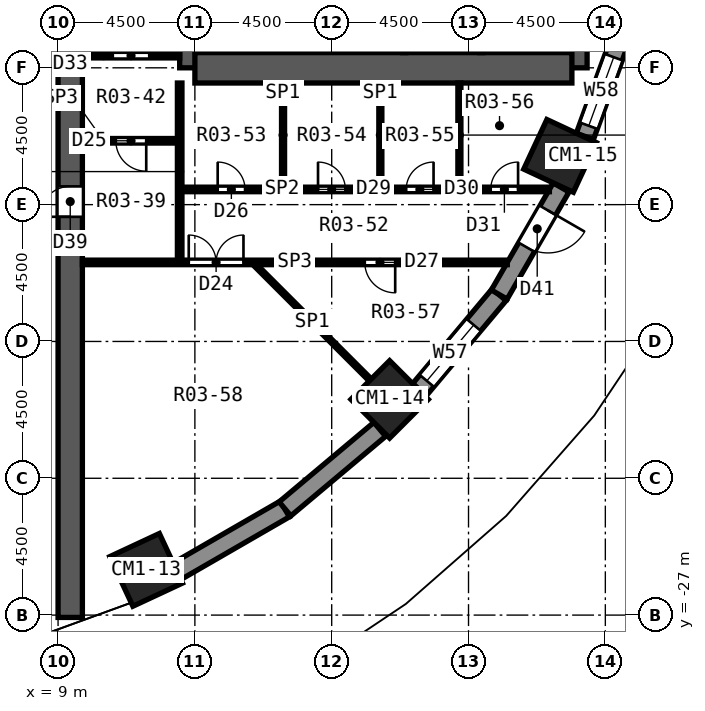
"""IFC4 building model, lengths in metres.
Left out: names, types, materials, properties, quantities, classifications, styles, units other than length and angle.
Written with IfcOpenShell. Run it as: python <this file> out.ifc"""

import sys

from ifc_helpers import new_model, si_unit, direction, frame, frame_2d, origin, origin_2d, place, context, subcontext, project, spatial, polyline, rectangle, outline, extrude, element, fill, save


model = new_model("IFC4")
c1 = context("Model", 3, precision=1e-05, world=origin(), true_north=direction((0.0, 1.0)))
c2 = subcontext(c1, "Body", "Model", "MODEL_VIEW")
j1 = project(units=[si_unit("LENGTHUNIT", "METRE"), si_unit("PLANEANGLEUNIT", "RADIAN")], contexts=[c1])
p1 = place(None, origin())
s1 = spatial("IfcSite", under=j1, at=p1, CompositionType="ELEMENT")
p2 = place(p1, origin())
s2 = spatial("IfcBuilding", under=s1, at=p2, CompositionType="ELEMENT")
p3 = place(p2, origin())
s3 = spatial("IfcBuildingStorey", under=s2, at=p3, CompositionType="ELEMENT", Elevation=0.0)
for number, where, z_axis, x_axis in (
    (1, (11.897, -25.512, 0.0), (0.0, 0.0, 1.0), (0.423, -0.906, 0.0)),
    (2, (19.905, -19.905, 0.0), (0.0, 0.0, 1.0), (0.707, -0.707, 0.0)),
    (3, (25.512, -11.897, 0.0), (0.0, 0.0, 1.0), (0.906, -0.423, 0.0)),
):
    element("IfcColumn", number, at=place(p3, frame(where, z_axis=z_axis, x_axis=x_axis)), inside=s3, PredefinedType="COLUMN", context=c2, shape_type="SweptSolid", body=[
        extrude(rectangle(XDim=1.8, YDim=1.8, at=origin_2d()), origin(), (0.0, 0.0, 1.0), 5.0),
    ])
p4 = place(p3, frame((13.5, -9.0, 0.0), z_axis=(0.0, 0.0, 1.0), x_axis=(0.0, 1.0, 0.0)))
e4 = element("IfcWall", 4, at=p4, inside=s3, PredefinedType="SHEAR", context=c2, shape_type="SweptSolid", body=[
    extrude(rectangle(XDim=18.0, YDim=1.0, at=frame_2d((9.0, 0.0))), origin(), (0.0, 0.0, 1.0), 5.0),
])
p5 = place(p4, frame((15.4, 0.0, 0.0)))
e5 = element("IfcOpeningElement", 5, at=p5, cuts=e4, PredefinedType="OPENING", context=c2, shape_type="SweptSolid", body=[
    extrude(rectangle(XDim=1.2, YDim=2.1, at=frame_2d((0.6, 1.05))), frame((0.0, 0.512, 0.0), z_axis=(0.0, -1.0, 0.0), x_axis=(1.0, 0.0, 0.0)), (0.0, 0.0, 1.0), 1.024),
])
p6 = place(p4, frame((1.4, 0.0, 0.0)))
e6 = element("IfcOpeningElement", 6, at=p6, cuts=e4, PredefinedType="OPENING", context=c2, shape_type="SweptSolid", body=[
    extrude(rectangle(XDim=1.2, YDim=2.1, at=frame_2d((0.6, 1.05))), frame((0.0, 0.512, 0.0), z_axis=(0.0, -1.0, 0.0), x_axis=(1.0, 0.0, 0.0)), (0.0, 0.0, 1.0), 1.024),
])
p7 = place(p4, frame((7.5, 0.0, 0.0)))
e7 = element("IfcOpeningElement", 7, at=p7, cuts=e4, PredefinedType="OPENING", context=c2, shape_type="SweptSolid", body=[
    extrude(rectangle(XDim=3.0, YDim=2.4, at=frame_2d((1.5, 1.2))), frame((0.0, 0.512, 0.0), z_axis=(0.0, -1.0, 0.0), x_axis=(1.0, 0.0, 0.0)), (0.0, 0.0, 1.0), 1.024),
])
p8 = place(p3, frame((25.9, -9.0, 0.0), z_axis=(0.0, 0.0, 1.0), x_axis=(0.0, 1.0, 0.0)))
e8 = element("IfcWall", 8, at=p8, inside=s3, PredefinedType="SHEAR", context=c2, shape_type="SweptSolid", body=[
    extrude(rectangle(XDim=18.0, YDim=1.0, at=frame_2d((9.0, 0.0))), origin(), (0.0, 0.0, 1.0), 5.0),
])
p9 = place(p3, frame((13.5, -9.0, 0.0), z_axis=(0.0, 0.0, 1.0), x_axis=(1.0, 0.0, 0.0)))
e9 = element("IfcWall", 9, at=p9, inside=s3, PredefinedType="SHEAR", context=c2, shape_type="SweptSolid", body=[
    extrude(rectangle(XDim=12.4, YDim=1.0, at=frame_2d((6.2, 0.0))), origin(), (0.0, 0.0, 1.0), 5.0),
])
p10 = place(p3, frame((9.4, -27.077, 0.0), z_axis=(0.0, 0.0, 1.0), x_axis=(0.0, 1.0, 0.0)))
e10 = element("IfcWall", 10, at=p10, inside=s3, PredefinedType="SHEAR", context=c2, shape_type="SweptSolid", body=[
    extrude(rectangle(XDim=54.154, YDim=0.8, at=frame_2d((27.077, 0.0))), origin(), (0.0, 0.0, 1.0), 5.0),
])
p11 = place(p10, frame((18.877, 0.0, 0.0)))
e11 = element("IfcOpeningElement", 11, at=p11, cuts=e10, PredefinedType="OPENING", context=c2, shape_type="SweptSolid", body=[
    extrude(rectangle(XDim=1.4, YDim=2.1, at=frame_2d((0.7, 1.05))), frame((0.0, 0.412, 0.0), z_axis=(0.0, -1.0, 0.0), x_axis=(1.0, 0.0, 0.0)), (0.0, 0.0, 1.0), 0.824),
])
p12 = place(p10, frame((22.677, 0.0, 0.3)))
e12 = element("IfcOpeningElement", 12, at=p12, cuts=e10, PredefinedType="OPENING", context=c2, shape_type="SweptSolid", body=[
    extrude(rectangle(XDim=2.4, YDim=2.1, at=frame_2d((1.2, 1.05))), frame((0.0, 0.412, 0.0), z_axis=(0.0, -1.0, 0.0), x_axis=(1.0, 0.0, 0.0)), (0.0, 0.0, 1.0), 0.824),
])
p13 = place(p10, frame((28.377, 0.0, 0.0)))
e13 = element("IfcOpeningElement", 13, at=p13, cuts=e10, PredefinedType="OPENING", context=c2, shape_type="SweptSolid", body=[
    extrude(rectangle(XDim=1.4, YDim=2.1, at=frame_2d((0.7, 1.05))), frame((0.0, 0.412, 0.0), z_axis=(0.0, -1.0, 0.0), x_axis=(1.0, 0.0, 0.0)), (0.0, 0.0, 1.0), 0.824),
])
p14 = place(p10, frame((29.977, 0.0, 0.3)))
e14 = element("IfcOpeningElement", 14, at=p14, cuts=e10, PredefinedType="OPENING", context=c2, shape_type="SweptSolid", body=[
    extrude(rectangle(XDim=2.4, YDim=2.1, at=frame_2d((1.2, 1.05))), frame((0.0, 0.412, 0.0), z_axis=(0.0, -1.0, 0.0), x_axis=(1.0, 0.0, 0.0)), (0.0, 0.0, 1.0), 0.824),
])
p15 = place(p10, frame((35.377, 0.0, 0.0)))
e15 = element("IfcOpeningElement", 15, at=p15, cuts=e10, PredefinedType="OPENING", context=c2, shape_type="SweptSolid", body=[
    extrude(rectangle(XDim=1.4, YDim=2.1, at=frame_2d((0.7, 1.05))), frame((0.0, 0.412, 0.0), z_axis=(0.0, -1.0, 0.0), x_axis=(1.0, 0.0, 0.0)), (0.0, 0.0, 1.0), 0.824),
])
p16 = place(p10, frame((38.477, 0.0, 0.3)))
e16 = element("IfcOpeningElement", 16, at=p16, cuts=e10, PredefinedType="OPENING", context=c2, shape_type="SweptSolid", body=[
    extrude(rectangle(XDim=2.4, YDim=2.1, at=frame_2d((1.2, 1.05))), frame((0.0, 0.412, 0.0), z_axis=(0.0, -1.0, 0.0), x_axis=(1.0, 0.0, 0.0)), (0.0, 0.0, 1.0), 0.824),
])
p17 = place(p10, frame((13.177, 0.0, 0.0)))
e17 = element("IfcOpeningElement", 17, at=p17, cuts=e10, PredefinedType="OPENING", context=c2, shape_type="SweptSolid", body=[
    extrude(rectangle(XDim=1.0, YDim=2.1, at=frame_2d((0.5, 1.05))), frame((0.0, 0.412, 0.0), z_axis=(0.0, -1.0, 0.0), x_axis=(1.0, 0.0, 0.0)), (0.0, 0.0, 1.0), 0.824),
])
p18 = place(p3, frame((12.934, -25.545, 0.0), z_axis=(0.0, 0.0, 1.0), x_axis=(0.866011732453, 0.500023678693, 0.0)))
e18 = element("IfcWall", 18, at=p18, inside=s3, PredefinedType="SOLIDWALL", context=c2, shape_type="SweptSolid", body=[
    extrude(rectangle(XDim=4.069, YDim=0.6, at=frame_2d((2.035, 0.0))), origin(), (0.0, 0.0, 1.0), 4.45),
])
p19 = place(p3, frame((16.464, -23.506, 0.0), z_axis=(0.0, 0.0, 1.0), x_axis=(0.766033337734, 0.642800844336, 0.0)))
e19 = element("IfcWall", 19, at=p19, inside=s3, PredefinedType="SOLIDWALL", context=c2, shape_type="SweptSolid", body=[
    extrude(rectangle(XDim=4.069, YDim=0.6, at=frame_2d((2.035, 0.0))), origin(), (0.0, 0.0, 1.0), 4.45),
])
p20 = place(p3, frame((20.891, -19.581, 0.0), z_axis=(0.0, 0.0, 1.0), x_axis=(0.642800844336, 0.766033337734, 0.0)))
e20 = element("IfcWall", 20, at=p20, inside=s3, PredefinedType="SOLIDWALL", context=c2, shape_type="SweptSolid", body=[
    extrude(rectangle(XDim=4.069, YDim=0.6, at=frame_2d((2.035, 0.0))), origin(), (0.0, 0.0, 1.0), 4.45),
])
p21 = place(p20, frame((0.372, 0.0, 0.3)))
e21 = element("IfcOpeningElement", 21, at=p21, cuts=e20, PredefinedType="OPENING", context=c2, shape_type="SweptSolid", body=[
    extrude(rectangle(XDim=2.4, YDim=2.1, at=frame_2d((1.2, 1.05))), frame((0.0, 0.312, 0.0), z_axis=(0.0, -1.0, 0.0), x_axis=(1.0, 0.0, 0.0)), (0.0, 0.0, 1.0), 0.624),
])
p22 = place(p3, frame((23.51, -16.458, 0.0), z_axis=(0.0, 0.0, 1.0), x_axis=(0.500023678693, 0.866011732453, 0.0)))
e22 = element("IfcWall", 22, at=p22, inside=s3, PredefinedType="SOLIDWALL", context=c2, shape_type="SweptSolid", body=[
    extrude(rectangle(XDim=4.069, YDim=0.6, at=frame_2d((2.035, 0.0))), origin(), (0.0, 0.0, 1.0), 4.45),
])
p23 = place(p22, frame((1.798, 0.0, 0.0)))
e23 = element("IfcOpeningElement", 23, at=p23, cuts=e22, PredefinedType="OPENING", context=c2, shape_type="SweptSolid", body=[
    extrude(rectangle(XDim=1.4, YDim=2.1, at=frame_2d((0.7, 1.05))), frame((0.0, 0.312, 0.0), z_axis=(0.0, -1.0, 0.0), x_axis=(1.0, 0.0, 0.0)), (0.0, 0.0, 1.0), 0.624),
])
p24 = place(p3, frame((26.328, -11.255, 0.0), z_axis=(0.0, 0.0, 1.0), x_axis=(0.342034744565, 0.939687306241, 0.0)))
e24 = element("IfcWall", 24, at=p24, inside=s3, PredefinedType="SOLIDWALL", context=c2, shape_type="SweptSolid", body=[
    extrude(rectangle(XDim=4.099, YDim=0.6, at=frame_2d((2.05, 0.0))), origin(), (0.0, 0.0, 1.0), 4.45),
])
p25 = place(p24, frame((0.372, 0.0, 0.3)))
e25 = element("IfcOpeningElement", 25, at=p25, cuts=e24, PredefinedType="OPENING", context=c2, shape_type="SweptSolid", body=[
    extrude(rectangle(XDim=2.4, YDim=2.1, at=frame_2d((1.2, 1.05))), frame((0.0, 0.312, 0.0), z_axis=(0.0, -1.0, 0.0), x_axis=(1.0, 0.0, 0.0)), (0.0, 0.0, 1.0), 0.624),
])
p26 = place(p3, frame((11.641, -26.507, 0.0), z_axis=(0.342042318612, -0.939682427765, 0.001996804339), x_axis=(-0.939684301135, -0.342043000515, 0.0)))
e26 = element("IfcWall", 26, at=p26, inside=s3, PredefinedType="SOLIDWALL", context=c2, shape_type="SweptSolid", body=[
    extrude(outline(polyline([(0.0, 0.0), (2.81, 2.168e-19), (2.81, -4.45), (0.0, -4.45), (0.0, 0.0)])), origin(), (0.0, 0.0, -1.0), 0.38),
])
p27 = place(p3, frame((15.453, -15.453, 0.0), z_axis=(0.0, 0.0, 1.0), x_axis=(0.707220086868, -0.706993457346, 0.0)))
e27 = element("IfcWall", 27, at=p27, inside=s3, PredefinedType="PARTITIONING", context=c2, shape_type="SweptSolid", body=[
    extrude(rectangle(XDim=5.386, YDim=0.1, at=frame_2d((2.693, 0.0))), origin(), (0.0, 0.0, 1.0), 4.45),
])
p28 = place(p3, frame((9.8, -15.4, 0.0), z_axis=(0.0, 0.0, 1.0), x_axis=(1.0, 0.0, 0.0)))
e28 = element("IfcWall", 28, at=p28, inside=s3, PredefinedType="PARTITIONING", context=c2, shape_type="SweptSolid", body=[
    extrude(rectangle(XDim=13.975, YDim=0.15, at=frame_2d((6.987, 0.0))), origin(), (0.0, 0.0, 1.0), 4.45),
])
p29 = place(p28, frame((3.498, 0.0, 0.0)))
e29 = element("IfcOpeningElement", 29, at=p29, cuts=e28, PredefinedType="OPENING", context=c2, shape_type="SweptSolid", body=[
    extrude(rectangle(XDim=1.8, YDim=2.1, at=frame_2d((0.9, 1.05))), frame((0.0, 0.087, 0.0), z_axis=(0.0, -1.0, 0.0), x_axis=(1.0, 0.0, 0.0)), (0.0, 0.0, 1.0), 0.174),
])
p30 = place(p28, frame((9.289, 0.0, 0.0)))
e30 = element("IfcOpeningElement", 30, at=p30, cuts=e28, PredefinedType="OPENING", context=c2, shape_type="SweptSolid", body=[
    extrude(rectangle(XDim=1.0, YDim=2.1, at=frame_2d((0.5, 1.05))), frame((0.0, 0.087, 0.0), z_axis=(0.0, -1.0, 0.0), x_axis=(1.0, 0.0, 0.0)), (0.0, 0.0, 1.0), 0.174),
])
p31 = place(p3, frame((13.075, -13.0, 0.0), z_axis=(0.0, 0.0, 1.0), x_axis=(1.0, 0.0, 0.0)))
e31 = element("IfcWall", 31, at=p31, inside=s3, PredefinedType="PARTITIONING", context=c2, shape_type="SweptSolid", body=[
    extrude(rectangle(XDim=12.085, YDim=0.15, at=frame_2d((6.042, 0.0))), origin(), (0.0, 0.0, 1.0), 4.45),
])
p32 = place(p31, frame((1.175, 0.0, 0.0)))
e32 = element("IfcOpeningElement", 32, at=p32, cuts=e31, PredefinedType="OPENING", context=c2, shape_type="SweptSolid", body=[
    extrude(rectangle(XDim=0.9, YDim=2.1, at=frame_2d((0.45, 1.05))), frame((0.0, 0.087, 0.0), z_axis=(0.0, -1.0, 0.0), x_axis=(1.0, 0.0, 0.0)), (0.0, 0.0, 1.0), 0.174),
])
p33 = place(p31, frame((4.475, 0.0, 0.0)))
e33 = element("IfcOpeningElement", 33, at=p33, cuts=e31, PredefinedType="OPENING", context=c2, shape_type="SweptSolid", body=[
    extrude(rectangle(XDim=0.9, YDim=2.1, at=frame_2d((0.45, 1.05))), frame((0.0, 0.087, 0.0), z_axis=(0.0, -1.0, 0.0), x_axis=(1.0, 0.0, 0.0)), (0.0, 0.0, 1.0), 0.174),
])
p34 = place(p31, frame((7.375, 0.0, 0.0)))
e34 = element("IfcOpeningElement", 34, at=p34, cuts=e31, PredefinedType="OPENING", context=c2, shape_type="SweptSolid", body=[
    extrude(rectangle(XDim=0.9, YDim=2.1, at=frame_2d((0.45, 1.05))), frame((0.0, 0.087, 0.0), z_axis=(0.0, -1.0, 0.0), x_axis=(1.0, 0.0, 0.0)), (0.0, 0.0, 1.0), 0.174),
])
p35 = place(p31, frame((10.155, 0.0, 0.0)))
e35 = element("IfcOpeningElement", 35, at=p35, cuts=e31, PredefinedType="OPENING", context=c2, shape_type="SweptSolid", body=[
    extrude(rectangle(XDim=0.9, YDim=2.1, at=frame_2d((0.45, 1.05))), frame((0.0, 0.087, 0.0), z_axis=(0.0, -1.0, 0.0), x_axis=(1.0, 0.0, 0.0)), (0.0, 0.0, 1.0), 0.174),
])
p36 = place(p3, frame((9.8, -11.4, 0.0), z_axis=(0.0, 0.0, 1.0), x_axis=(1.0, 0.0, 0.0)))
e36 = element("IfcWall", 36, at=p36, inside=s3, PredefinedType="PARTITIONING", context=c2, shape_type="SweptSolid", body=[
    extrude(rectangle(XDim=3.125, YDim=0.15, at=frame_2d((1.562, 0.0))), origin(), (0.0, 0.0, 1.0), 4.45),
])
p37 = place(p36, frame((1.1, 0.0, 0.0)))
e37 = element("IfcOpeningElement", 37, at=p37, cuts=e36, PredefinedType="OPENING", context=c2, shape_type="SweptSolid", body=[
    extrude(rectangle(XDim=1.0, YDim=2.1, at=frame_2d((0.5, 1.05))), frame((0.0, 0.087, 0.0), z_axis=(0.0, -1.0, 0.0), x_axis=(1.0, 0.0, 0.0)), (0.0, 0.0, 1.0), 0.174),
])
p38 = place(p3, frame((9.8, -8.6, 0.0), z_axis=(0.0, 0.0, 1.0), x_axis=(1.0, 0.0, 0.0)))
e38 = element("IfcWall", 38, at=p38, inside=s3, PredefinedType="PARTITIONING", context=c2, shape_type="SweptSolid", body=[
    extrude(rectangle(XDim=3.2, YDim=0.15, at=frame_2d((1.6, 0.0))), origin(), (0.0, 0.0, 1.0), 4.45),
])
p39 = place(p38, frame((1.0, 0.0, 0.0)))
e39 = element("IfcOpeningElement", 39, at=p39, cuts=e38, PredefinedType="OPENING", context=c2, shape_type="SweptSolid", body=[
    extrude(rectangle(XDim=1.2, YDim=2.1, at=frame_2d((0.6, 1.05))), frame((0.0, 0.087, 0.0), z_axis=(0.0, -1.0, 0.0), x_axis=(1.0, 0.0, 0.0)), (0.0, 0.0, 1.0), 0.174),
])
for number, where, z_axis, x_axis in (
    (40, (22.2, -12.925, 0.0), (0.0, 0.0, 1.0), (0.0, 1.0, 0.0)),
    (41, (19.6, -12.925, 0.0), (0.0, 0.0, 1.0), (0.0, 1.0, 0.0)),
    (42, (16.4, -12.925, 0.0), (0.0, 0.0, 1.0), (0.0, 1.0, 0.0)),
):
    element("IfcWall", number, at=place(p3, frame(where, z_axis=z_axis, x_axis=x_axis)), inside=s3, PredefinedType="PARTITIONING", context=c2, shape_type="SweptSolid", body=[
        extrude(rectangle(XDim=3.425, YDim=0.1, at=frame_2d((1.712, 0.0))), origin(), (0.0, 0.0, 1.0), 4.45),
    ])
p40 = place(p3, frame((13.0, -15.325, 0.0), z_axis=(0.0, 0.0, 1.0), x_axis=(0.0, 1.0, 0.0)))
e43 = element("IfcWall", 43, at=p40, inside=s3, PredefinedType="PARTITIONING", context=c2, shape_type="SweptSolid", body=[
    extrude(rectangle(XDim=5.825, YDim=0.15, at=frame_2d((2.913, 0.0))), origin(), (0.0, 0.0, 1.0), 4.45),
])
p41 = place(p29, origin())
e44 = element("IfcDoor", 44, at=p41, inside=s3, OperationType="DOUBLE_DOOR_SINGLE_SWING", PredefinedType="DOOR", context=c2, shape_type="SweptSolid", body=[
    extrude(rectangle(XDim=1.8, YDim=2.1, at=frame_2d((0.9, 1.05))), frame((0.0, 0.025, 0.0), z_axis=(0.0, -1.0, 0.0), x_axis=(1.0, 0.0, 0.0)), (0.0, 0.0, 1.0), 0.05),
])
fill(e29, e44)
p42 = place(p37, frame((1.0, 0.0, 0.0), z_axis=(0.0, 0.0, 1.0), x_axis=(-1.0, 0.0, 0.0)))
e45 = element("IfcDoor", 45, at=p42, inside=s3, OperationType="SINGLE_SWING_LEFT", PredefinedType="DOOR", context=c2, shape_type="SweptSolid", body=[
    extrude(rectangle(XDim=1.0, YDim=2.1, at=frame_2d((0.5, 1.05))), frame((0.0, 0.025, 0.0), z_axis=(0.0, -1.0, 0.0), x_axis=(1.0, 0.0, 0.0)), (0.0, 0.0, 1.0), 0.05),
])
fill(e37, e45)
p43 = place(p32, origin())
e46 = element("IfcDoor", 46, at=p43, inside=s3, OperationType="SINGLE_SWING_LEFT", PredefinedType="DOOR", context=c2, shape_type="SweptSolid", body=[
    extrude(rectangle(XDim=0.9, YDim=2.1, at=frame_2d((0.45, 1.05))), frame((0.0, 0.025, 0.0), z_axis=(0.0, -1.0, 0.0), x_axis=(1.0, 0.0, 0.0)), (0.0, 0.0, 1.0), 0.05),
])
fill(e32, e46)
p44 = place(p30, frame((1.0, 0.0, 0.0), z_axis=(0.0, 0.0, 1.0), x_axis=(-1.0, 0.0, 0.0)))
e47 = element("IfcDoor", 47, at=p44, inside=s3, OperationType="SINGLE_SWING_LEFT", PredefinedType="DOOR", context=c2, shape_type="SweptSolid", body=[
    extrude(rectangle(XDim=1.0, YDim=2.1, at=frame_2d((0.5, 1.05))), frame((0.0, 0.025, 0.0), z_axis=(0.0, -1.0, 0.0), x_axis=(1.0, 0.0, 0.0)), (0.0, 0.0, 1.0), 0.05),
])
fill(e30, e47)
p45 = place(p39, origin())
e48 = element("IfcDoor", 48, at=p45, inside=s3, OperationType="SINGLE_SWING_RIGHT", PredefinedType="DOOR", context=c2, shape_type="SweptSolid", body=[
    extrude(rectangle(XDim=1.2, YDim=2.1, at=frame_2d((0.6, 1.05))), frame((0.0, 0.025, 0.0), z_axis=(0.0, -1.0, 0.0), x_axis=(1.0, 0.0, 0.0)), (0.0, 0.0, 1.0), 0.05),
])
fill(e39, e48)
p46 = place(p33, origin())
e49 = element("IfcDoor", 49, at=p46, inside=s3, OperationType="SINGLE_SWING_LEFT", PredefinedType="DOOR", context=c2, shape_type="SweptSolid", body=[
    extrude(rectangle(XDim=0.9, YDim=2.1, at=frame_2d((0.45, 1.05))), frame((0.0, 0.025, 0.0), z_axis=(0.0, -1.0, 0.0), x_axis=(1.0, 0.0, 0.0)), (0.0, 0.0, 1.0), 0.05),
])
fill(e33, e49)
p47 = place(p34, origin())
e50 = element("IfcDoor", 50, at=p47, inside=s3, OperationType="SINGLE_SWING_RIGHT", PredefinedType="DOOR", context=c2, shape_type="SweptSolid", body=[
    extrude(rectangle(XDim=0.9, YDim=2.1, at=frame_2d((0.45, 1.05))), frame((0.0, 0.025, 0.0), z_axis=(0.0, -1.0, 0.0), x_axis=(1.0, 0.0, 0.0)), (0.0, 0.0, 1.0), 0.05),
])
fill(e34, e50)
p48 = place(p35, origin())
e51 = element("IfcDoor", 51, at=p48, inside=s3, OperationType="SINGLE_SWING_RIGHT", PredefinedType="DOOR", context=c2, shape_type="SweptSolid", body=[
    extrude(rectangle(XDim=0.9, YDim=2.1, at=frame_2d((0.45, 1.05))), frame((0.0, 0.025, 0.0), z_axis=(0.0, -1.0, 0.0), x_axis=(1.0, 0.0, 0.0)), (0.0, 0.0, 1.0), 0.05),
])
fill(e35, e51)
p49 = place(p17, origin())
e52 = element("IfcDoor", 52, at=p49, inside=s3, OperationType="SINGLE_SWING_LEFT", PredefinedType="DOOR", context=c2, shape_type="SweptSolid", body=[
    extrude(rectangle(XDim=1.0, YDim=2.1, at=frame_2d((0.5, 1.05))), frame((0.0, 0.025, 0.0), z_axis=(0.0, -1.0, 0.0), x_axis=(1.0, 0.0, 0.0)), (0.0, 0.0, 1.0), 0.05),
])
fill(e17, e52)
p50 = place(p23, frame((1.4, 0.0, 0.0), z_axis=(0.0, 0.0, 1.0), x_axis=(-1.0, 0.0, 0.0)))
e53 = element("IfcDoor", 53, at=p50, inside=s3, OperationType="SINGLE_SWING_LEFT", PredefinedType="DOOR", context=c2, shape_type="SweptSolid", body=[
    extrude(rectangle(XDim=1.4, YDim=2.1, at=frame_2d((0.7, 1.05))), frame((0.0, 0.025, 0.0), z_axis=(0.0, -1.0, 0.0), x_axis=(1.0, 0.0, 0.0)), (0.0, 0.0, 1.0), 0.05),
])
fill(e23, e53)
p51 = place(p21, origin())
e54 = element("IfcWindow", 54, at=p51, inside=s3, PartitioningType="SINGLE_PANEL", PredefinedType="WINDOW", context=c2, shape_type="SweptSolid", body=[
    extrude(rectangle(XDim=2.4, YDim=2.1, at=frame_2d((1.2, 1.05))), frame((0.0, 0.03, 0.0), z_axis=(0.0, -1.0, 0.0), x_axis=(1.0, 0.0, 0.0)), (0.0, 0.0, 1.0), 0.06),
])
fill(e21, e54)
p52 = place(p25, origin())
e55 = element("IfcWindow", 55, at=p52, inside=s3, PartitioningType="SINGLE_PANEL", PredefinedType="WINDOW", context=c2, shape_type="SweptSolid", body=[
    extrude(rectangle(XDim=2.4, YDim=2.1, at=frame_2d((1.2, 1.05))), frame((0.0, 0.03, 0.0), z_axis=(0.0, -1.0, 0.0), x_axis=(1.0, 0.0, 0.0)), (0.0, 0.0, 1.0), 0.06),
])
fill(e25, e55)
save(model, sys.argv[1])
